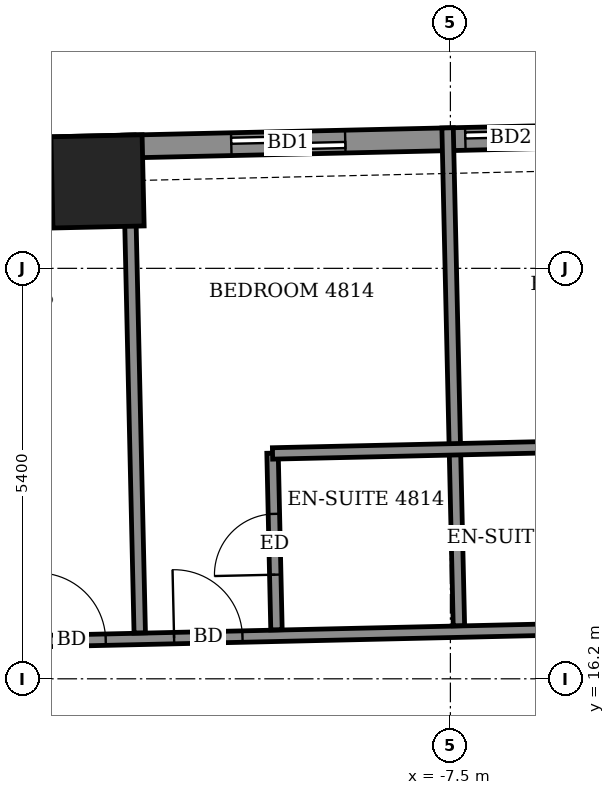
"""IFC4 building model, lengths in metres.
Left out: names, types, materials, properties, quantities, classifications, styles, units other than length and angle.
Written with IfcOpenShell. Run it as: python <this file> out.ifc"""

import sys

from ifc_helpers import new_model, si_unit, direction, frame, frame_2d, origin, origin_2d, place, context, subcontext, project, spatial, rectangle, extrude, element, fill, save


model = new_model("IFC4")
c1 = context("Model", 3, precision=1e-05, world=origin(), true_north=direction((0.0, 1.0)))
c2 = subcontext(c1, "Body", "Model", "MODEL_VIEW")
j1 = project(units=[si_unit("LENGTHUNIT", "METRE"), si_unit("PLANEANGLEUNIT", "RADIAN")], contexts=[c1])
p1 = place(None, origin())
s1 = spatial("IfcSite", under=j1, at=p1, CompositionType="ELEMENT")
p2 = place(p1, origin())
s2 = spatial("IfcBuilding", under=s1, at=p2, CompositionType="ELEMENT")
p3 = place(p2, frame((0.0, 0.0, 189.7)))
s3 = spatial("IfcBuildingStorey", under=s2, at=p3, CompositionType="ELEMENT", Elevation=189.7)
p4 = place(p3, frame((-12.142, 22.744, -0.55), z_axis=(0.0, 0.0, 1.0), x_axis=(-0.99974369748, -0.022639331897, 0.0)))
e1 = element("IfcColumn", 1, at=p4, inside=s3, PredefinedType="COLUMN", context=c2, shape_type="SweptSolid", body=[
    extrude(rectangle(XDim=1.2, YDim=1.2, at=origin_2d()), origin(), (0.0, 0.0, 1.0), 3.6),
])
p5 = place(p3, frame((21.589, 23.959, 0.0), z_axis=(0.0, 0.0, 1.0), x_axis=(-0.999742668524, -0.022684724649, 0.0)))
e2 = element("IfcWall", 2, at=p5, inside=s3, PredefinedType="SOLIDWALL", context=c2, shape_type="SweptSolid", body=[
    extrude(rectangle(XDim=40.822, YDim=0.3, at=frame_2d((20.411, 0.0))), origin(), (0.0, 0.0, 1.0), 3.05),
])
p6 = place(p5, frame((1.553, 0.0, 0.0)))
e3 = element("IfcOpeningElement", 3, at=p6, cuts=e2, PredefinedType="OPENING", context=c2, shape_type="SweptSolid", body=[
    extrude(rectangle(XDim=1.5, YDim=2.4, at=frame_2d((0.75, 1.2))), frame((0.0, 0.16, 0.0), z_axis=(0.0, -1.0, 0.0), x_axis=(1.0, 0.0, 0.0)), (0.0, 0.0, 1.0), 0.32),
])
p7 = place(p5, frame((4.33, 0.0, 0.0)))
e4 = element("IfcOpeningElement", 4, at=p7, cuts=e2, PredefinedType="OPENING", context=c2, shape_type="SweptSolid", body=[
    extrude(rectangle(XDim=1.5, YDim=2.4, at=frame_2d((0.75, 1.2))), frame((0.0, 0.16, 0.0), z_axis=(0.0, -1.0, 0.0), x_axis=(1.0, 0.0, 0.0)), (0.0, 0.0, 1.0), 0.32),
])
p8 = place(p5, frame((9.43, 0.0, 0.0)))
e5 = element("IfcOpeningElement", 5, at=p8, cuts=e2, PredefinedType="OPENING", context=c2, shape_type="SweptSolid", body=[
    extrude(rectangle(XDim=1.5, YDim=2.4, at=frame_2d((0.75, 1.2))), frame((0.0, 0.16, 0.0), z_axis=(0.0, -1.0, 0.0), x_axis=(1.0, 0.0, 0.0)), (0.0, 0.0, 1.0), 0.32),
])
p9 = place(p5, frame((14.37, 0.0, 0.0)))
e6 = element("IfcOpeningElement", 6, at=p9, cuts=e2, PredefinedType="OPENING", context=c2, shape_type="SweptSolid", body=[
    extrude(rectangle(XDim=1.5, YDim=2.4, at=frame_2d((0.75, 1.2))), frame((0.0, 0.16, 0.0), z_axis=(0.0, -1.0, 0.0), x_axis=(1.0, 0.0, 0.0)), (0.0, 0.0, 1.0), 0.32),
])
p10 = place(p5, frame((17.41, 0.0, 0.0)))
e7 = element("IfcOpeningElement", 7, at=p10, cuts=e2, PredefinedType="OPENING", context=c2, shape_type="SweptSolid", body=[
    extrude(rectangle(XDim=1.5, YDim=2.4, at=frame_2d((0.75, 1.2))), frame((0.0, 0.16, 0.0), z_axis=(0.0, -1.0, 0.0), x_axis=(1.0, 0.0, 0.0)), (0.0, 0.0, 1.0), 0.32),
])
p11 = place(p5, frame((22.03, 0.0, 0.0)))
e8 = element("IfcOpeningElement", 8, at=p11, cuts=e2, PredefinedType="OPENING", context=c2, shape_type="SweptSolid", body=[
    extrude(rectangle(XDim=1.5, YDim=2.4, at=frame_2d((0.75, 1.2))), frame((0.0, 0.16, 0.0), z_axis=(0.0, -1.0, 0.0), x_axis=(1.0, 0.0, 0.0)), (0.0, 0.0, 1.0), 0.32),
])
p12 = place(p5, frame((27.7, 0.0, 0.0)))
e9 = element("IfcOpeningElement", 9, at=p12, cuts=e2, PredefinedType="OPENING", context=c2, shape_type="SweptSolid", body=[
    extrude(rectangle(XDim=1.2, YDim=2.4, at=frame_2d((0.6, 1.2))), frame((0.0, 0.16, 0.0), z_axis=(0.0, -1.0, 0.0), x_axis=(1.0, 0.0, 0.0)), (0.0, 0.0, 1.0), 0.32),
])
p13 = place(p5, frame((30.48, 0.0, 0.0)))
e10 = element("IfcOpeningElement", 10, at=p13, cuts=e2, PredefinedType="OPENING", context=c2, shape_type="SweptSolid", body=[
    extrude(rectangle(XDim=1.5, YDim=2.4, at=frame_2d((0.75, 1.2))), frame((0.0, 0.16, 0.0), z_axis=(0.0, -1.0, 0.0), x_axis=(1.0, 0.0, 0.0)), (0.0, 0.0, 1.0), 0.32),
])
p14 = place(p5, frame((35.065, 0.0, 0.0)))
e11 = element("IfcOpeningElement", 11, at=p14, cuts=e2, PredefinedType="OPENING", context=c2, shape_type="SweptSolid", body=[
    extrude(rectangle(XDim=1.5, YDim=2.4, at=frame_2d((0.75, 1.2))), frame((0.0, 0.16, 0.0), z_axis=(0.0, -1.0, 0.0), x_axis=(1.0, 0.0, 0.0)), (0.0, 0.0, 1.0), 0.32),
])
p15 = place(p5, frame((37.945, 0.0, 0.9)))
e12 = element("IfcOpeningElement", 12, at=p15, cuts=e2, PredefinedType="OPENING", context=c2, shape_type="SweptSolid", body=[
    extrude(rectangle(XDim=1.2, YDim=1.5, at=frame_2d((0.6, 0.75))), frame((0.0, 0.16, 0.0), z_axis=(0.0, -1.0, 0.0), x_axis=(1.0, 0.0, 0.0)), (0.0, 0.0, 1.0), 0.32),
])
p16 = place(p3, frame((-15.649, 16.633, 0.0), z_axis=(0.0, 0.0, 1.0), x_axis=(0.999743261737, 0.022658565952, 0.0)))
e13 = element("IfcWall", 13, at=p16, inside=s3, PredefinedType="PARTITIONING", context=c2, shape_type="SweptSolid", body=[
    extrude(rectangle(XDim=30.536, YDim=0.15, at=frame_2d((15.268, 0.0))), origin(), (0.0, 0.0, 1.0), 3.05),
])
p17 = place(p16, frame((29.536, 0.0, 0.0)))
e14 = element("IfcOpeningElement", 14, at=p17, cuts=e13, PredefinedType="OPENING", context=c2, shape_type="SweptSolid", body=[
    extrude(rectangle(XDim=0.9, YDim=2.1, at=frame_2d((0.45, 1.05))), frame((0.0, 0.085, 0.0), z_axis=(0.0, -1.0, 0.0), x_axis=(1.0, 0.0, 0.0)), (0.0, 0.0, 1.0), 0.17),
])
p18 = place(p16, frame((27.965, 0.0, 0.0)))
e15 = element("IfcOpeningElement", 15, at=p18, cuts=e13, PredefinedType="OPENING", context=c2, shape_type="SweptSolid", body=[
    extrude(rectangle(XDim=0.9, YDim=2.1, at=frame_2d((0.45, 1.05))), frame((0.0, 0.085, 0.0), z_axis=(0.0, -1.0, 0.0), x_axis=(1.0, 0.0, 0.0)), (0.0, 0.0, 1.0), 0.17),
])
p19 = place(p16, frame((21.365, 0.0, 0.0)))
e16 = element("IfcOpeningElement", 16, at=p19, cuts=e13, PredefinedType="OPENING", context=c2, shape_type="SweptSolid", body=[
    extrude(rectangle(XDim=0.9, YDim=2.1, at=frame_2d((0.45, 1.05))), frame((0.0, 0.085, 0.0), z_axis=(0.0, -1.0, 0.0), x_axis=(1.0, 0.0, 0.0)), (0.0, 0.0, 1.0), 0.17),
])
p20 = place(p16, frame((19.565, 0.0, 0.0)))
e17 = element("IfcOpeningElement", 17, at=p20, cuts=e13, PredefinedType="OPENING", context=c2, shape_type="SweptSolid", body=[
    extrude(rectangle(XDim=0.9, YDim=2.1, at=frame_2d((0.45, 1.05))), frame((0.0, 0.085, 0.0), z_axis=(0.0, -1.0, 0.0), x_axis=(1.0, 0.0, 0.0)), (0.0, 0.0, 1.0), 0.17),
])
p21 = place(p16, frame((12.965, 0.0, 0.0)))
e18 = element("IfcOpeningElement", 18, at=p21, cuts=e13, PredefinedType="OPENING", context=c2, shape_type="SweptSolid", body=[
    extrude(rectangle(XDim=0.9, YDim=2.1, at=frame_2d((0.45, 1.05))), frame((0.0, 0.085, 0.0), z_axis=(0.0, -1.0, 0.0), x_axis=(1.0, 0.0, 0.0)), (0.0, 0.0, 1.0), 0.17),
])
p22 = place(p16, frame((11.14, 0.0, 0.0)))
e19 = element("IfcOpeningElement", 19, at=p22, cuts=e13, PredefinedType="OPENING", context=c2, shape_type="SweptSolid", body=[
    extrude(rectangle(XDim=0.9, YDim=2.1, at=frame_2d((0.45, 1.05))), frame((0.0, 0.085, 0.0), z_axis=(0.0, -1.0, 0.0), x_axis=(1.0, 0.0, 0.0)), (0.0, 0.0, 1.0), 0.17),
])
p23 = place(p16, frame((4.515, 0.0, 0.0)))
e20 = element("IfcOpeningElement", 20, at=p23, cuts=e13, PredefinedType="OPENING", context=c2, shape_type="SweptSolid", body=[
    extrude(rectangle(XDim=0.9, YDim=2.1, at=frame_2d((0.45, 1.05))), frame((0.0, 0.085, 0.0), z_axis=(0.0, -1.0, 0.0), x_axis=(1.0, 0.0, 0.0)), (0.0, 0.0, 1.0), 0.17),
])
p24 = place(p16, frame((2.715, 0.0, 0.0)))
e21 = element("IfcOpeningElement", 21, at=p24, cuts=e13, PredefinedType="OPENING", context=c2, shape_type="SweptSolid", body=[
    extrude(rectangle(XDim=0.9, YDim=2.1, at=frame_2d((0.45, 1.05))), frame((0.0, 0.085, 0.0), z_axis=(0.0, -1.0, 0.0), x_axis=(1.0, 0.0, 0.0)), (0.0, 0.0, 1.0), 0.17),
])
p25 = place(p3, frame((-11.587, 16.804, 0.0), z_axis=(0.0, 0.0, 1.0), x_axis=(-0.022771353855, 0.999740699103, 0.0)))
e22 = element("IfcWall", 22, at=p25, inside=s3, PredefinedType="PARTITIONING", context=c2, shape_type="SweptSolid", body=[
    extrude(rectangle(XDim=6.551, YDim=0.15, at=frame_2d((3.275, 0.0))), origin(), (0.0, 0.0, 1.0), 3.05),
])
p26 = place(p3, frame((-9.788, 16.845, 0.0), z_axis=(0.0, 0.0, 1.0), x_axis=(-0.022370700241, 0.999749744571, 0.0)))
e23 = element("IfcWall", 23, at=p26, inside=s3, PredefinedType="PARTITIONING", context=c2, shape_type="SweptSolid", body=[
    extrude(rectangle(XDim=2.324, YDim=0.15, at=frame_2d((1.162, 0.0))), origin(), (0.0, 0.0, 1.0), 3.05),
])
p27 = place(p26, frame((0.725, 0.0, 0.0)))
e24 = element("IfcOpeningElement", 24, at=p27, cuts=e23, PredefinedType="OPENING", context=c2, shape_type="SweptSolid", body=[
    extrude(rectangle(XDim=0.8, YDim=2.1, at=frame_2d((0.4, 1.05))), frame((0.0, 0.085, 0.0), z_axis=(0.0, -1.0, 0.0), x_axis=(1.0, 0.0, 0.0)), (0.0, 0.0, 1.0), 0.17),
])
p28 = place(p3, frame((-7.388, 16.899, 0.0), z_axis=(0.0, 0.0, 1.0), x_axis=(-0.022771353855, 0.999740699103, 0.0)))
e25 = element("IfcWall", 25, at=p28, inside=s3, PredefinedType="PARTITIONING", context=c2, shape_type="SweptSolid", body=[
    extrude(rectangle(XDim=6.551, YDim=0.15, at=frame_2d((3.275, 0.0))), origin(), (0.0, 0.0, 1.0), 2.55),
])
p29 = place(p3, frame((-9.84, 19.165, 0.0), z_axis=(0.0, 0.0, 1.0), x_axis=(0.999742596585, 0.02268789488, 0.0)))
e26 = element("IfcWall", 26, at=p29, inside=s3, PredefinedType="PARTITIONING", context=c2, shape_type="SweptSolid", body=[
    extrude(rectangle(XDim=4.799, YDim=0.15, at=frame_2d((2.4, 0.0))), origin(), (0.0, 0.0, 1.0), 3.05),
])
p30 = place(p12, origin())
e27 = element("IfcDoor", 27, at=p30, inside=s3, OperationType="SLIDING_TO_LEFT", PredefinedType="DOOR", context=c2, shape_type="SweptSolid", body=[
    extrude(rectangle(XDim=1.2, YDim=2.4, at=frame_2d((0.6, 1.2))), frame((0.0, 0.025, 0.0), z_axis=(0.0, -1.0, 0.0), x_axis=(1.0, 0.0, 0.0)), (0.0, 0.0, 1.0), 0.05),
])
fill(e9, e27)
p31 = place(p13, origin())
e28 = element("IfcDoor", 28, at=p31, inside=s3, OperationType="SLIDING_TO_LEFT", PredefinedType="DOOR", context=c2, shape_type="SweptSolid", body=[
    extrude(rectangle(XDim=1.5, YDim=2.4, at=frame_2d((0.75, 1.2))), frame((0.0, 0.025, 0.0), z_axis=(0.0, -1.0, 0.0), x_axis=(1.0, 0.0, 0.0)), (0.0, 0.0, 1.0), 0.05),
])
fill(e10, e28)
p32 = place(p23, origin())
e29 = element("IfcDoor", 29, at=p32, inside=s3, OperationType="SINGLE_SWING_RIGHT", PredefinedType="DOOR", context=c2, shape_type="SweptSolid", body=[
    extrude(rectangle(XDim=0.9, YDim=2.1, at=frame_2d((0.45, 1.05))), frame((0.0, 0.025, 0.0), z_axis=(0.0, -1.0, 0.0), x_axis=(1.0, 0.0, 0.0)), (0.0, 0.0, 1.0), 0.05),
])
fill(e20, e29)
p33 = place(p27, origin())
e30 = element("IfcDoor", 30, at=p33, inside=s3, OperationType="SINGLE_SWING_RIGHT", PredefinedType="DOOR", context=c2, shape_type="SweptSolid", body=[
    extrude(rectangle(XDim=0.8, YDim=2.1, at=frame_2d((0.4, 1.05))), frame((0.0, 0.025, 0.0), z_axis=(0.0, -1.0, 0.0), x_axis=(1.0, 0.0, 0.0)), (0.0, 0.0, 1.0), 0.05),
])
fill(e24, e30)
p34 = place(p24, origin())
e31 = element("IfcDoor", 31, at=p34, inside=s3, OperationType="SINGLE_SWING_LEFT", PredefinedType="DOOR", context=c2, shape_type="SweptSolid", body=[
    extrude(rectangle(XDim=0.9, YDim=2.1, at=frame_2d((0.45, 1.05))), frame((0.0, 0.025, 0.0), z_axis=(0.0, -1.0, 0.0), x_axis=(1.0, 0.0, 0.0)), (0.0, 0.0, 1.0), 0.05),
])
fill(e21, e31)
save(model, sys.argv[1])
